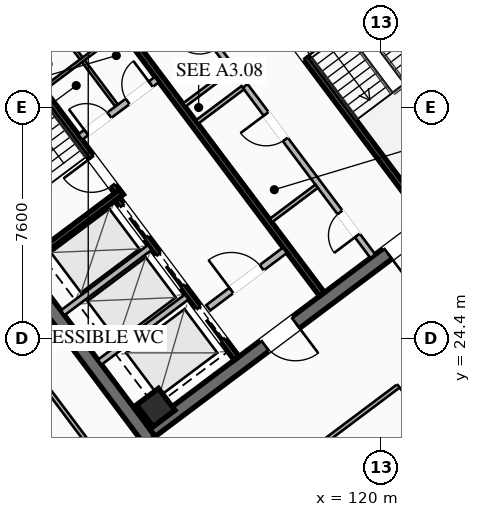
"""IFC4 building model, lengths in metres.
Left out: names, types, materials, properties, quantities, classifications, styles, units other than length and angle.
Written with IfcOpenShell. Run it as: python <this file> out.ifc"""

import sys

from ifc_helpers import new_model, si_unit, direction, frame, frame_2d, origin, origin_2d, place, context, subcontext, project, spatial, rectangle, hollow_rectangle, extrude, element, fill, save


model = new_model("IFC4")
c1 = context("Model", 3, precision=1e-05, world=origin(), true_north=direction((0.0, 1.0)))
c2 = subcontext(c1, "Body", "Model", "MODEL_VIEW")
j1 = project(units=[si_unit("LENGTHUNIT", "METRE"), si_unit("PLANEANGLEUNIT", "RADIAN")], contexts=[c1])
p1 = place(None, origin())
s1 = spatial("IfcSite", under=j1, at=p1, CompositionType="ELEMENT")
p2 = place(p1, origin())
s2 = spatial("IfcBuilding", under=s1, at=p2, CompositionType="ELEMENT")
p3 = place(p2, frame((0.0, 0.0, 218.4)))
s3 = spatial("IfcBuildingStorey", under=s2, at=p3, CompositionType="ELEMENT", Elevation=218.4)
for number, where, z_axis, x_axis in (
    (1, (112.396, 21.047, 0.0), (0.0, 0.0, 1.0), (-0.6, 0.8, 0.0)),
    (2, (115.604, 42.953, 0.0), (0.0, 0.0, 1.0), (0.6, -0.8, 0.0)),
):
    element("IfcWall", number, at=place(p3, frame(where, z_axis=z_axis, x_axis=x_axis)), inside=s3, PredefinedType="SHEAR", context=c2, shape_type="SweptSolid", body=[
        extrude(rectangle(XDim=15.6, YDim=0.45, at=frame_2d((7.8, 0.0))), origin(), (0.0, 0.0, 1.0), 3.55),
    ])
p4 = place(p3, frame((124.649, 30.518, 0.0), z_axis=(0.0, 0.0, 1.0), x_axis=(-0.8, -0.6, 0.0)))
e3 = element("IfcWall", 3, at=p4, inside=s3, PredefinedType="SHEAR", context=c2, shape_type="SweptSolid", body=[
    extrude(rectangle(XDim=15.26, YDim=0.45, at=frame_2d((7.63, 0.0))), origin(), (0.0, 0.0, 1.0), 3.55),
])
p5 = place(p4, frame((9.33, 0.0, 0.0)))
e4 = element("IfcOpeningElement", 4, at=p5, cuts=e3, PredefinedType="OPENING", context=c2, shape_type="SweptSolid", body=[
    extrude(rectangle(XDim=1.25, YDim=2.25, at=frame_2d((0.625, 1.125))), frame((0.0, 0.235, 0.0), z_axis=(0.0, -1.0, 0.0), x_axis=(1.0, 0.0, 0.0)), (0.0, 0.0, 1.0), 0.47),
])
p6 = place(p4, frame((4.28, 0.0, 0.0)))
e5 = element("IfcOpeningElement", 5, at=p6, cuts=e3, PredefinedType="OPENING", context=c2, shape_type="SweptSolid", body=[
    extrude(rectangle(XDim=1.25, YDim=2.25, at=frame_2d((0.625, 1.125))), frame((0.0, 0.235, 0.0), z_axis=(0.0, -1.0, 0.0), x_axis=(1.0, 0.0, 0.0)), (0.0, 0.0, 1.0), 0.47),
])
p7 = place(p3, frame((103.351, 33.482, 0.0), z_axis=(0.0, 0.0, 1.0), x_axis=(0.8, 0.6, 0.0)))
e6 = element("IfcWall", 6, at=p7, inside=s3, PredefinedType="SHEAR", context=c2, shape_type="SweptSolid", body=[
    extrude(rectangle(XDim=15.26, YDim=0.45, at=frame_2d((7.63, 0.0))), origin(), (0.0, 0.0, 1.0), 3.55),
])
p8 = place(p7, frame((4.68, 0.0, 0.0)))
e7 = element("IfcOpeningElement", 7, at=p8, cuts=e6, PredefinedType="OPENING", context=c2, shape_type="SweptSolid", body=[
    extrude(rectangle(XDim=1.25, YDim=2.25, at=frame_2d((0.625, 1.125))), frame((0.0, 0.235, 0.0), z_axis=(0.0, -1.0, 0.0), x_axis=(1.0, 0.0, 0.0)), (0.0, 0.0, 1.0), 0.47),
])
p9 = place(p7, frame((9.73, 0.0, 0.0)))
e8 = element("IfcOpeningElement", 8, at=p9, cuts=e6, PredefinedType="OPENING", context=c2, shape_type="SweptSolid", body=[
    extrude(rectangle(XDim=1.25, YDim=2.25, at=frame_2d((0.625, 1.125))), frame((0.0, 0.235, 0.0), z_axis=(0.0, -1.0, 0.0), x_axis=(1.0, 0.0, 0.0)), (0.0, 0.0, 1.0), 0.47),
])
p10 = place(p3, frame((112.59, 22.13, 0.0), z_axis=(0.0, 0.0, 1.0), x_axis=(0.799999996291, 0.600000004945, 0.0)))
e9 = element("IfcColumn", 9, at=p10, inside=s3, PredefinedType="COLUMN", context=c2, shape_type="SweptSolid", body=[
    extrude(hollow_rectangle(XDim=0.9, YDim=0.9, WallThickness=0.04, at=origin_2d()), origin(), (0.0, 0.0, 1.0), 3.37),
])
p11 = place(p3, frame((111.44, 29.08, 0.0), z_axis=(0.0, 0.0, 1.0), x_axis=(-0.59999041401, 0.800007189403, 0.0)))
e10 = element("IfcWall", 10, at=p11, inside=s3, PredefinedType="SHEAR", context=c2, shape_type="SweptSolid", body=[
    extrude(rectangle(XDim=8.15, YDim=0.2, at=frame_2d((4.075, 0.0))), origin(), (0.0, 0.0, 1.0), 3.37),
])
p12 = place(p11, frame((0.45, 0.0, 0.0)))
e11 = element("IfcOpeningElement", 11, at=p12, cuts=e10, PredefinedType="OPENING", context=c2, shape_type="SweptSolid", body=[
    extrude(rectangle(XDim=1.15, YDim=2.2, at=frame_2d((0.575, 1.1))), frame((0.0, 0.11, 0.0), z_axis=(0.0, -1.0, 0.0), x_axis=(1.0, 0.0, 0.0)), (0.0, 0.0, 1.0), 0.22),
])
p13 = place(p3, frame((108.316, 26.862, 0.0), z_axis=(0.0, 0.0, 1.0), x_axis=(0.800014909178, 0.599980120581, 0.0)))
e12 = element("IfcWall", 12, at=p13, inside=s3, PredefinedType="SHEAR", context=c2, shape_type="SweptSolid", body=[
    extrude(rectangle(XDim=3.93, YDim=0.2, at=frame_2d((1.965, 0.0))), origin(), (0.0, 0.0, 1.0), 3.37),
])
p14 = place(p3, frame((116.56, 34.92, 0.0), z_axis=(0.0, 0.0, 1.0), x_axis=(0.59999041401, -0.800007189403, 0.0)))
e13 = element("IfcWall", 13, at=p14, inside=s3, PredefinedType="SHEAR", context=c2, shape_type="SweptSolid", body=[
    extrude(rectangle(XDim=8.15, YDim=0.2, at=frame_2d((4.075, 0.0))), origin(), (0.0, 0.0, 1.0), 3.37),
])
p15 = place(p14, frame((0.45, 0.0, 0.0)))
e14 = element("IfcOpeningElement", 14, at=p15, cuts=e13, PredefinedType="OPENING", context=c2, shape_type="SweptSolid", body=[
    extrude(rectangle(XDim=1.15, YDim=2.2, at=frame_2d((0.575, 1.1))), frame((0.0, 0.11, 0.0), z_axis=(0.0, -1.0, 0.0), x_axis=(1.0, 0.0, 0.0)), (0.0, 0.0, 1.0), 0.22),
])
p16 = place(p3, frame((118.058, 25.856, 0.0), z_axis=(0.0, 0.0, 1.0), x_axis=(-0.600002657301, 0.799998007018, 0.0)))
e15 = element("IfcWall", 15, at=p16, inside=s3, PredefinedType="SHEAR", context=c2, shape_type="SweptSolid", body=[
    extrude(rectangle(XDim=14.7, YDim=0.2, at=frame_2d((7.35, 0.0))), origin(), (0.0, 0.0, 1.0), 3.37),
])
p17 = place(p3, frame((110.104, 31.028, 0.0), z_axis=(0.0, 0.0, 1.0), x_axis=(0.800018601094, 0.59997519774, 0.0)))
e16 = element("IfcWall", 16, at=p17, inside=s3, PredefinedType="SOLIDWALL", context=c2, shape_type="SweptSolid", body=[
    extrude(rectangle(XDim=3.15, YDim=0.22, at=frame_2d((1.575, 0.0))), origin(), (0.0, 0.0, 1.0), 2.723),
])
p18 = place(p17, frame((0.25, 0.0, 0.0)))
e17 = element("IfcOpeningElement", 17, at=p18, cuts=e16, PredefinedType="OPENING", context=c2, shape_type="SweptSolid", body=[
    extrude(rectangle(XDim=0.95, YDim=2.05, at=frame_2d((0.475, 1.025))), frame((0.0, 0.12, 0.0), z_axis=(0.0, -1.0, 0.0), x_axis=(1.0, 0.0, 0.0)), (0.0, 0.0, 1.0), 0.24),
])
p19 = place(p17, frame((1.95, 0.0, 0.0)))
e18 = element("IfcOpeningElement", 18, at=p19, cuts=e16, PredefinedType="OPENING", context=c2, shape_type="SweptSolid", body=[
    extrude(rectangle(XDim=0.95, YDim=2.05, at=frame_2d((0.475, 1.025))), frame((0.0, 0.12, 0.0), z_axis=(0.0, -1.0, 0.0), x_axis=(1.0, 0.0, 0.0)), (0.0, 0.0, 1.0), 0.24),
])
p20 = place(p3, frame((114.316, 25.412, 0.0), z_axis=(0.0, 0.0, 1.0), x_axis=(0.800018601094, 0.59997519774, 0.0)))
e19 = element("IfcWall", 19, at=p20, inside=s3, PredefinedType="SOLIDWALL", context=c2, shape_type="SweptSolid", body=[
    extrude(rectangle(XDim=3.15, YDim=0.22, at=frame_2d((1.575, 0.0))), origin(), (0.0, 0.0, 1.0), 2.723),
])
p21 = place(p20, frame((0.95, 0.0, 0.0)))
e20 = element("IfcOpeningElement", 20, at=p21, cuts=e19, PredefinedType="OPENING", context=c2, shape_type="SweptSolid", body=[
    extrude(rectangle(XDim=1.25, YDim=2.25, at=frame_2d((0.625, 1.125))), frame((0.0, 0.12, 0.0), z_axis=(0.0, -1.0, 0.0), x_axis=(1.0, 0.0, 0.0)), (0.0, 0.0, 1.0), 0.24),
])
p22 = place(p3, frame((115.25, 23.75, 0.0), z_axis=(0.0, 0.0, 1.0), x_axis=(-0.599994036198, 0.800004472816, 0.0)))
e21 = element("IfcWall", 21, at=p22, inside=s3, PredefinedType="SHEAR", context=c2, shape_type="SweptSolid", body=[
    extrude(rectangle(XDim=6.55, YDim=0.2, at=frame_2d((3.275, 0.0))), origin(), (0.0, 0.0, 1.0), 3.37),
])
p23 = place(p22, frame((4.975, 0.0, 0.0)))
e22 = element("IfcOpeningElement", 22, at=p23, cuts=e21, PredefinedType="OPENING", context=c2, shape_type="SweptSolid", body=[
    extrude(rectangle(XDim=1.3, YDim=2.25, at=frame_2d((0.65, 1.125))), frame((0.0, 0.11, 0.0), z_axis=(0.0, -1.0, 0.0), x_axis=(1.0, 0.0, 0.0)), (0.0, 0.0, 1.0), 0.22),
])
p24 = place(p22, frame((2.975, 0.0, 0.0)))
e23 = element("IfcOpeningElement", 23, at=p24, cuts=e21, PredefinedType="OPENING", context=c2, shape_type="SweptSolid", body=[
    extrude(rectangle(XDim=1.3, YDim=2.25, at=frame_2d((0.65, 1.125))), frame((0.0, 0.11, 0.0), z_axis=(0.0, -1.0, 0.0), x_axis=(1.0, 0.0, 0.0)), (0.0, 0.0, 1.0), 0.22),
])
p25 = place(p22, frame((0.775, 0.0, 0.0)))
e24 = element("IfcOpeningElement", 24, at=p25, cuts=e21, PredefinedType="OPENING", context=c2, shape_type="SweptSolid", body=[
    extrude(rectangle(XDim=1.3, YDim=2.25, at=frame_2d((0.65, 1.125))), frame((0.0, 0.11, 0.0), z_axis=(0.0, -1.0, 0.0), x_axis=(1.0, 0.0, 0.0)), (0.0, 0.0, 1.0), 0.22),
])
for number, where, z_axis, x_axis in (
    (25, (110.746, 23.622, 0.0), (0.0, 0.0, 1.0), (0.8, 0.6, 0.0)),
    (26, (109.528, 25.246, 0.0), (0.0, 0.0, 1.0), (0.8, 0.6, 0.0)),
):
    element("IfcWall", number, at=place(p3, frame(where, z_axis=z_axis, x_axis=x_axis)), inside=s3, PredefinedType="SOLIDWALL", context=c2, shape_type="SweptSolid", body=[
        extrude(rectangle(XDim=3.58, YDim=0.2, at=frame_2d((1.79, 0.0))), origin(), (0.0, 0.0, 1.0), 3.37),
    ])
p26 = place(p3, frame((111.296, 32.072, 0.0), z_axis=(0.0, 0.0, 1.0), x_axis=(-0.59995887973, 0.800030838552, 0.0)))
e27 = element("IfcWall", 27, at=p26, inside=s3, PredefinedType="PARTITIONING", context=c2, shape_type="SweptSolid", body=[
    extrude(rectangle(XDim=3.8, YDim=0.11, at=frame_2d((1.9, 0.0))), origin(), (0.0, 0.0, 1.0), 2.723),
])
p27 = place(p3, frame((108.91, 32.62, 0.0), z_axis=(0.0, 0.0, 1.0), x_axis=(0.800018601094, 0.59997519774, 0.0)))
e28 = element("IfcWall", 28, at=p27, inside=s3, PredefinedType="PARTITIONING", context=c2, shape_type="SweptSolid", body=[
    extrude(rectangle(XDim=3.15, YDim=0.11, at=frame_2d((1.575, 0.0))), origin(), (0.0, 0.0, 1.0), 2.723),
])
p28 = place(p3, frame((119.73, 27.11, 0.0), z_axis=(0.0, 0.0, 1.0), x_axis=(-0.600005580459, 0.799995814625, 0.0)))
e29 = element("IfcWall", 29, at=p28, inside=s3, PredefinedType="SOLIDWALL", context=c2, shape_type="SweptSolid", body=[
    extrude(rectangle(XDim=7.0, YDim=0.2, at=frame_2d((3.5, 0.0))), origin(), (0.0, 0.0, 1.0), 2.723),
])
p29 = place(p28, frame((0.85, 0.0, 0.0)))
e30 = element("IfcOpeningElement", 30, at=p29, cuts=e29, PredefinedType="OPENING", context=c2, shape_type="SweptSolid", body=[
    extrude(rectangle(XDim=0.95, YDim=2.05, at=frame_2d((0.475, 1.025))), frame((0.0, 0.11, 0.0), z_axis=(0.0, -1.0, 0.0), x_axis=(1.0, 0.0, 0.0)), (0.0, 0.0, 1.0), 0.22),
])
p30 = place(p28, frame((4.8, 0.0, 0.0)))
e31 = element("IfcOpeningElement", 31, at=p30, cuts=e29, PredefinedType="OPENING", context=c2, shape_type="SweptSolid", body=[
    extrude(rectangle(XDim=1.05, YDim=2.2, at=frame_2d((0.525, 1.1))), frame((0.0, 0.11, 0.0), z_axis=(0.0, -1.0, 0.0), x_axis=(1.0, 0.0, 0.0)), (0.0, 0.0, 1.0), 0.22),
])
for number, where, z_axis, x_axis in (
    (32, (113.946, 31.522, 0.0), (0.0, 0.0, 1.0), (0.8, 0.6, 0.0)),
    (33, (116.376, 28.282, 0.0), (0.0, 0.0, 1.0), (0.8, 0.6, 0.0)),
):
    element("IfcWall", number, at=place(p3, frame(where, z_axis=z_axis, x_axis=x_axis)), inside=s3, PredefinedType="PARTITIONING", context=c2, shape_type="SweptSolid", body=[
        extrude(rectangle(XDim=1.88, YDim=0.135, at=frame_2d((0.94, 0.0))), origin(), (0.0, 0.0, 1.0), 2.723),
    ])
p31 = place(p3, frame((115.11, 33.27, 0.0), z_axis=(0.0, 0.0, 1.0), x_axis=(-0.600011160345, 0.79999162962, 0.0)))
e34 = element("IfcWall", 34, at=p31, inside=s3, PredefinedType="SOLIDWALL", context=c2, shape_type="SweptSolid", body=[
    extrude(rectangle(XDim=7.0, YDim=0.2, at=frame_2d((3.5, 0.0))), origin(), (0.0, 0.0, 1.0), 2.723),
])
p32 = place(p31, frame((0.85, 0.0, 0.0)))
e35 = element("IfcOpeningElement", 35, at=p32, cuts=e34, PredefinedType="OPENING", context=c2, shape_type="SweptSolid", body=[
    extrude(rectangle(XDim=0.95, YDim=2.05, at=frame_2d((0.475, 1.025))), frame((0.0, 0.11, 0.0), z_axis=(0.0, -1.0, 0.0), x_axis=(1.0, 0.0, 0.0)), (0.0, 0.0, 1.0), 0.22),
])
p33 = place(p31, frame((4.85, 0.0, 0.0)))
e36 = element("IfcOpeningElement", 36, at=p33, cuts=e34, PredefinedType="OPENING", context=c2, shape_type="SweptSolid", body=[
    extrude(rectangle(XDim=0.95, YDim=2.05, at=frame_2d((0.475, 1.025))), frame((0.0, 0.11, 0.0), z_axis=(0.0, -1.0, 0.0), x_axis=(1.0, 0.0, 0.0)), (0.0, 0.0, 1.0), 0.22),
])
p34 = place(p3, frame((113.526, 32.082, 0.0), z_axis=(0.0, 0.0, 1.0), x_axis=(0.800046745961, 0.599937666993, 0.0)))
e37 = element("IfcWall", 37, at=p34, inside=s3, PredefinedType="PARTITIONING", context=c2, shape_type="SweptSolid", body=[
    extrude(rectangle(XDim=1.88, YDim=0.135, at=frame_2d((0.94, 0.0))), origin(), (0.0, 0.0, 1.0), 2.723),
])
p35 = place(p3, frame((100.826, 33.682, 0.0), z_axis=(0.0, 0.0, 1.0), x_axis=(0.79999742786, 0.600003429504, 0.0)))
e38 = element("IfcWall", 38, at=p35, inside=s3, PredefinedType="PARTITIONING", context=c2, shape_type="SweptSolid", body=[
    extrude(rectangle(XDim=22.78, YDim=0.135, at=frame_2d((11.39, 0.0))), origin(), (0.0, 0.0, 1.0), 2.723),
])
p36 = place(p35, frame((0.3, 0.0, 0.0)))
e39 = element("IfcOpeningElement", 39, at=p36, cuts=e38, PredefinedType="OPENING", context=c2, shape_type="SweptSolid", body=[
    extrude(rectangle(XDim=0.95, YDim=2.05, at=frame_2d((0.475, 1.025))), frame((0.0, 0.077, 0.0), z_axis=(0.0, -1.0, 0.0), x_axis=(1.0, 0.0, 0.0)), (0.0, 0.0, 1.0), 0.155),
])
p37 = place(p35, frame((9.143, 0.0, 0.0)))
e40 = element("IfcOpeningElement", 40, at=p37, cuts=e38, PredefinedType="OPENING", context=c2, shape_type="SweptSolid", body=[
    extrude(rectangle(XDim=0.95, YDim=2.05, at=frame_2d((0.475, 1.025))), frame((0.0, 0.077, 0.0), z_axis=(0.0, -1.0, 0.0), x_axis=(1.0, 0.0, 0.0)), (0.0, 0.0, 1.0), 0.155),
])
p38 = place(p35, frame((21.53, 0.0, 0.0)))
e41 = element("IfcOpeningElement", 41, at=p38, cuts=e38, PredefinedType="OPENING", context=c2, shape_type="SweptSolid", body=[
    extrude(rectangle(XDim=0.95, YDim=2.05, at=frame_2d((0.475, 1.025))), frame((0.0, 0.077, 0.0), z_axis=(0.0, -1.0, 0.0), x_axis=(1.0, 0.0, 0.0)), (0.0, 0.0, 1.0), 0.155),
])
p39 = place(p3, frame((124.282, 25.624, 0.0), z_axis=(0.0, 0.0, 1.0), x_axis=(-0.800004206286, -0.599994391578, 0.0)))
e42 = element("IfcWall", 42, at=p39, inside=s3, PredefinedType="PARTITIONING", context=c2, shape_type="SweptSolid", body=[
    extrude(rectangle(XDim=13.93, YDim=0.135, at=frame_2d((6.965, 0.0))), origin(), (0.0, 0.0, 1.0), 2.723),
])
p40 = place(p39, frame((3.69, 0.0, 0.0)))
e43 = element("IfcOpeningElement", 43, at=p40, cuts=e42, PredefinedType="OPENING", context=c2, shape_type="SweptSolid", body=[
    extrude(rectangle(XDim=0.95, YDim=2.05, at=frame_2d((0.475, 1.025))), frame((0.0, 0.077, 0.0), z_axis=(0.0, -1.0, 0.0), x_axis=(1.0, 0.0, 0.0)), (0.0, 0.0, 1.0), 0.155),
])
p41 = place(p3, frame((113.09, 17.33, 0.0), z_axis=(0.0, 0.0, 1.0), x_axis=(-0.60000575578, 0.799995683132, 0.0)))
e44 = element("IfcWall", 44, at=p41, inside=s3, PredefinedType="PARTITIONING", context=c2, shape_type="SweptSolid", body=[
    extrude(rectangle(XDim=20.36, YDim=0.135, at=frame_2d((10.18, 0.0))), origin(), (0.0, 0.0, 1.0), 2.723),
])
p42 = place(p41, frame((0.3, 0.0, 0.0)))
e45 = element("IfcOpeningElement", 45, at=p42, cuts=e44, PredefinedType="OPENING", context=c2, shape_type="SweptSolid", body=[
    extrude(rectangle(XDim=0.95, YDim=2.05, at=frame_2d((0.475, 1.025))), frame((0.0, 0.077, 0.0), z_axis=(0.0, -1.0, 0.0), x_axis=(1.0, 0.0, 0.0)), (0.0, 0.0, 1.0), 0.155),
])
p43 = place(p5, origin())
e46 = element("IfcDoor", 46, at=p43, inside=s3, OperationType="SINGLE_SWING_LEFT", PredefinedType="DOOR", context=c2, shape_type="SweptSolid", body=[
    extrude(rectangle(XDim=1.25, YDim=2.25, at=frame_2d((0.625, 1.125))), frame((0.0, 0.025, 0.0), z_axis=(0.0, -1.0, 0.0), x_axis=(1.0, 0.0, 0.0)), (0.0, 0.0, 1.0), 0.05),
])
fill(e4, e46)
p44 = place(p6, origin())
e47 = element("IfcDoor", 47, at=p44, inside=s3, OperationType="SINGLE_SWING_RIGHT", PredefinedType="DOOR", context=c2, shape_type="SweptSolid", body=[
    extrude(rectangle(XDim=1.25, YDim=2.25, at=frame_2d((0.625, 1.125))), frame((0.0, 0.025, 0.0), z_axis=(0.0, -1.0, 0.0), x_axis=(1.0, 0.0, 0.0)), (0.0, 0.0, 1.0), 0.05),
])
fill(e5, e47)
p45 = place(p12, origin())
e48 = element("IfcDoor", 48, at=p45, inside=s3, OperationType="SINGLE_SWING_RIGHT", PredefinedType="DOOR", context=c2, shape_type="SweptSolid", body=[
    extrude(rectangle(XDim=1.15, YDim=2.2, at=frame_2d((0.575, 1.1))), frame((0.0, 0.025, 0.0), z_axis=(0.0, -1.0, 0.0), x_axis=(1.0, 0.0, 0.0)), (0.0, 0.0, 1.0), 0.05),
])
fill(e11, e48)
p46 = place(p15, origin())
e49 = element("IfcDoor", 49, at=p46, inside=s3, OperationType="SINGLE_SWING_RIGHT", PredefinedType="DOOR", context=c2, shape_type="SweptSolid", body=[
    extrude(rectangle(XDim=1.15, YDim=2.2, at=frame_2d((0.575, 1.1))), frame((0.0, 0.025, 0.0), z_axis=(0.0, -1.0, 0.0), x_axis=(1.0, 0.0, 0.0)), (0.0, 0.0, 1.0), 0.05),
])
fill(e14, e49)
p47 = place(p21, origin())
e50 = element("IfcDoor", 50, at=p47, inside=s3, OperationType="SINGLE_SWING_LEFT", PredefinedType="DOOR", context=c2, shape_type="SweptSolid", body=[
    extrude(rectangle(XDim=1.25, YDim=2.25, at=frame_2d((0.625, 1.125))), frame((0.0, 0.025, 0.0), z_axis=(0.0, -1.0, 0.0), x_axis=(1.0, 0.0, 0.0)), (0.0, 0.0, 1.0), 0.05),
])
fill(e20, e50)
p48 = place(p18, origin())
e51 = element("IfcDoor", 51, at=p48, inside=s3, OperationType="SINGLE_SWING_LEFT", PredefinedType="DOOR", context=c2, shape_type="SweptSolid", body=[
    extrude(rectangle(XDim=0.95, YDim=2.05, at=frame_2d((0.475, 1.025))), frame((0.0, 0.025, 0.0), z_axis=(0.0, -1.0, 0.0), x_axis=(1.0, 0.0, 0.0)), (0.0, 0.0, 1.0), 0.05),
])
fill(e17, e51)
p49 = place(p19, origin())
e52 = element("IfcDoor", 52, at=p49, inside=s3, OperationType="SINGLE_SWING_RIGHT", PredefinedType="DOOR", context=c2, shape_type="SweptSolid", body=[
    extrude(rectangle(XDim=0.95, YDim=2.05, at=frame_2d((0.475, 1.025))), frame((0.0, 0.025, 0.0), z_axis=(0.0, -1.0, 0.0), x_axis=(1.0, 0.0, 0.0)), (0.0, 0.0, 1.0), 0.05),
])
fill(e18, e52)
p50 = place(p29, origin())
e53 = element("IfcDoor", 53, at=p50, inside=s3, OperationType="SINGLE_SWING_LEFT", PredefinedType="DOOR", context=c2, shape_type="SweptSolid", body=[
    extrude(rectangle(XDim=0.95, YDim=2.05, at=frame_2d((0.475, 1.025))), frame((0.0, 0.025, 0.0), z_axis=(0.0, -1.0, 0.0), x_axis=(1.0, 0.0, 0.0)), (0.0, 0.0, 1.0), 0.05),
])
fill(e30, e53)
p51 = place(p30, origin())
e54 = element("IfcDoor", 54, at=p51, inside=s3, OperationType="SINGLE_SWING_RIGHT", PredefinedType="DOOR", context=c2, shape_type="SweptSolid", body=[
    extrude(rectangle(XDim=1.05, YDim=2.2, at=frame_2d((0.525, 1.1))), frame((0.0, 0.025, 0.0), z_axis=(0.0, -1.0, 0.0), x_axis=(1.0, 0.0, 0.0)), (0.0, 0.0, 1.0), 0.05),
])
fill(e31, e54)
p52 = place(p40, origin())
e55 = element("IfcDoor", 55, at=p52, inside=s3, OperationType="SINGLE_SWING_RIGHT", PredefinedType="DOOR", context=c2, shape_type="SweptSolid", body=[
    extrude(rectangle(XDim=0.95, YDim=2.05, at=frame_2d((0.475, 1.025))), frame((0.0, 0.025, 0.0), z_axis=(0.0, -1.0, 0.0), x_axis=(1.0, 0.0, 0.0)), (0.0, 0.0, 1.0), 0.05),
])
fill(e43, e55)
p53 = place(p23, origin())
e56 = element("IfcDoor", 56, at=p53, inside=s3, OperationType="SLIDING_TO_LEFT", PredefinedType="DOOR", context=c2, shape_type="SweptSolid", body=[
    extrude(rectangle(XDim=1.3, YDim=2.25, at=frame_2d((0.65, 1.125))), frame((0.0, 0.025, 0.0), z_axis=(0.0, -1.0, 0.0), x_axis=(1.0, 0.0, 0.0)), (0.0, 0.0, 1.0), 0.05),
])
fill(e22, e56)
p54 = place(p24, origin())
e57 = element("IfcDoor", 57, at=p54, inside=s3, OperationType="SLIDING_TO_LEFT", PredefinedType="DOOR", context=c2, shape_type="SweptSolid", body=[
    extrude(rectangle(XDim=1.3, YDim=2.25, at=frame_2d((0.65, 1.125))), frame((0.0, 0.025, 0.0), z_axis=(0.0, -1.0, 0.0), x_axis=(1.0, 0.0, 0.0)), (0.0, 0.0, 1.0), 0.05),
])
fill(e23, e57)
p55 = place(p25, origin())
e58 = element("IfcDoor", 58, at=p55, inside=s3, OperationType="SLIDING_TO_LEFT", PredefinedType="DOOR", context=c2, shape_type="SweptSolid", body=[
    extrude(rectangle(XDim=1.3, YDim=2.25, at=frame_2d((0.65, 1.125))), frame((0.0, 0.025, 0.0), z_axis=(0.0, -1.0, 0.0), x_axis=(1.0, 0.0, 0.0)), (0.0, 0.0, 1.0), 0.05),
])
fill(e24, e58)
save(model, sys.argv[1])
